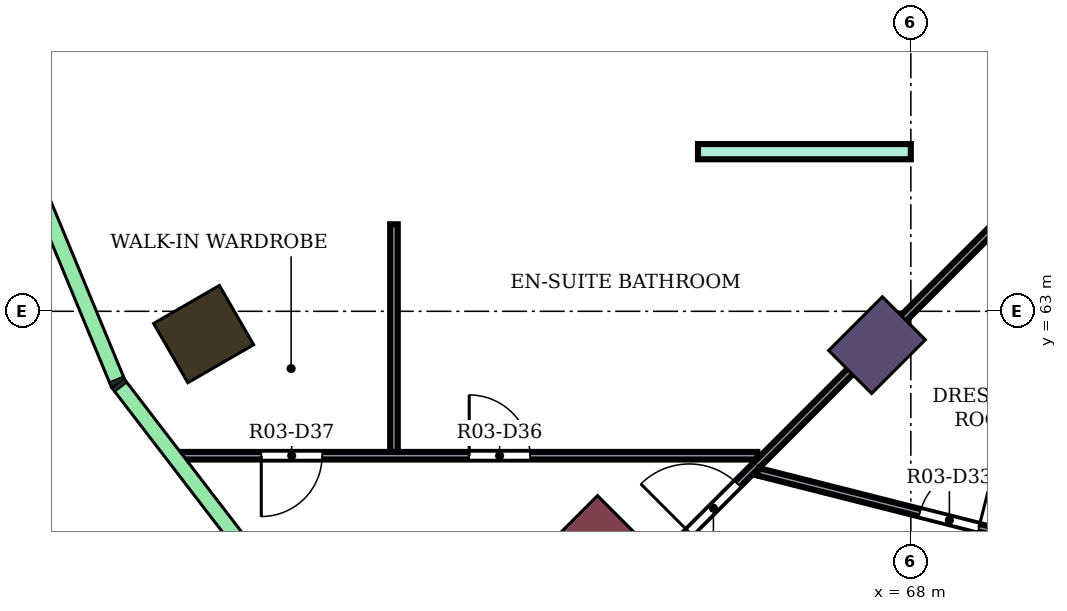
"""IFC4 building model, lengths in metres.
Left out: names, types, materials, properties, quantities, classifications, styles, units other than length and angle.
Written with IfcOpenShell. Run it as: python <this file> out.ifc"""

import sys

from ifc_helpers import new_model, si_unit, direction, frame, frame_2d, origin, origin_2d, place, context, subcontext, project, spatial, rectangle, extrude, element, fill, save


model = new_model("IFC4")
c1 = context("Model", 3, precision=1e-05, world=origin(), true_north=direction((0.0, 1.0)))
c2 = subcontext(c1, "Body", "Model", "MODEL_VIEW")
j1 = project(units=[si_unit("LENGTHUNIT", "METRE"), si_unit("PLANEANGLEUNIT", "RADIAN")], contexts=[c1])
p1 = place(None, origin())
s1 = spatial("IfcSite", under=j1, at=p1, CompositionType="ELEMENT")
p2 = place(p1, origin())
s2 = spatial("IfcBuilding", under=s1, at=p2, CompositionType="ELEMENT")
p3 = place(p2, frame((0.0, 0.0, 190.5)))
s3 = spatial("IfcBuildingStorey", under=s2, at=p3, CompositionType="ELEMENT", Elevation=190.5)
p4 = place(p3, frame((58.696, 62.7, 0.0), z_axis=(0.0, 0.0, 1.0), x_axis=(-0.866025403784, -0.5, 0.0)))
e1 = element("IfcColumn", 1, at=p4, inside=s3, PredefinedType="COLUMN", context=c2, shape_type="SweptSolid", body=[
    extrude(rectangle(XDim=1.0, YDim=0.9, at=origin_2d()), origin(), (0.0, 0.0, 1.0), 4.1),
])
p5 = place(p3, frame((67.555, 62.555, 0.0), z_axis=(0.0, 0.0, 1.0), x_axis=(-0.707106781187, -0.707106781187, 0.0)))
e2 = element("IfcColumn", 2, at=p5, inside=s3, PredefinedType="COLUMN", context=c2, shape_type="SweptSolid", body=[
    extrude(rectangle(XDim=1.0, YDim=0.8, at=origin_2d()), origin(), (0.0, 0.0, 1.0), 4.1),
])
p6 = place(p3, frame((64.09, 59.09, 0.0), z_axis=(0.0, 0.0, 1.0), x_axis=(-0.707106781187, -0.707106781187, 0.0)))
e3 = element("IfcColumn", 3, at=p6, inside=s3, PredefinedType="COLUMN", context=c2, shape_type="SweptSolid", body=[
    extrude(rectangle(XDim=1.8, YDim=2.4, at=origin_2d()), origin(), (0.0, 0.0, 1.0), 4.1),
])
p7 = place(p3, frame((65.2, 65.1, 0.0), z_axis=(0.0, 0.0, 1.0), x_axis=(1.0, 0.0, 0.0)))
e4 = element("IfcWall", 4, at=p7, inside=s3, PredefinedType="PARTITIONING", context=c2, shape_type="SweptSolid", body=[
    extrude(rectangle(XDim=2.8, YDim=0.2, at=frame_2d((1.4, 0.0))), origin(), (0.0, 0.0, 1.0), 3.65),
])
p8 = place(p3, frame((58.379, 61.1, 0.0), z_axis=(0.0, 0.0, 1.0), x_axis=(1.0, 0.0, 0.0)))
e5 = element("IfcWall", 5, at=p8, inside=s3, PredefinedType="PARTITIONING", context=c2, shape_type="SweptSolid", body=[
    extrude(rectangle(XDim=7.601, YDim=0.1, at=frame_2d((3.801, 0.0))), origin(), (0.0, 0.0, 1.0), 3.65),
])
p9 = place(p8, frame((3.811, 0.0, 0.0)))
e6 = element("IfcOpeningElement", 6, at=p9, cuts=e5, PredefinedType="OPENING", context=c2, shape_type="SweptSolid", body=[
    extrude(rectangle(XDim=0.8, YDim=2.1, at=frame_2d((0.4, 1.05))), frame((0.0, 0.06, 0.0), z_axis=(0.0, -1.0, 0.0), x_axis=(1.0, 0.0, 0.0)), (0.0, 0.0, 1.0), 0.12),
])
p10 = place(p8, frame((1.075, 0.0, 0.0)))
e7 = element("IfcOpeningElement", 7, at=p10, cuts=e5, PredefinedType="OPENING", context=c2, shape_type="SweptSolid", body=[
    extrude(rectangle(XDim=0.8, YDim=2.1, at=frame_2d((0.4, 1.05))), frame((0.0, 0.06, 0.0), z_axis=(0.0, -1.0, 0.0), x_axis=(1.0, 0.0, 0.0)), (0.0, 0.0, 1.0), 0.12),
])
p11 = place(p3, frame((61.2, 61.15, 0.0), z_axis=(0.0, 0.0, 1.0), x_axis=(0.0, 1.0, 0.0)))
e8 = element("IfcWall", 8, at=p11, inside=s3, PredefinedType="PARTITIONING", context=c2, shape_type="SweptSolid", body=[
    extrude(rectangle(XDim=2.995, YDim=0.1, at=frame_2d((1.498, 0.0))), origin(), (0.0, 0.0, 1.0), 3.65),
])
p12 = place(p3, frame((63.592, 58.6, 0.0), z_axis=(0.0, 0.0, 1.0), x_axis=(0.707272108928, 0.706941414781, 0.0)))
e9 = element("IfcWall", 9, at=p12, inside=s3, PredefinedType="PARTITIONING", context=c2, shape_type="SweptSolid", body=[
    extrude(rectangle(XDim=8.859, YDim=0.1, at=frame_2d((4.43, 0.0))), origin(), (0.0, 0.0, 1.0), 3.65),
])
p13 = place(p12, frame((2.111, 0.0, 0.0)))
e10 = element("IfcOpeningElement", 10, at=p13, cuts=e9, PredefinedType="OPENING", context=c2, shape_type="SweptSolid", body=[
    extrude(rectangle(XDim=0.9, YDim=2.1, at=frame_2d((0.45, 1.05))), frame((0.0, 0.06, 0.0), z_axis=(0.0, -1.0, 0.0), x_axis=(1.0, 0.0, 0.0)), (0.0, 0.0, 1.0), 0.12),
])
p14 = place(p3, frame((65.987, 60.889, 0.0), z_axis=(0.0, 0.0, 1.0), x_axis=(0.969431303535, -0.245362889871, 0.0)))
e11 = element("IfcWall", 11, at=p14, inside=s3, PredefinedType="PARTITIONING", context=c2, shape_type="SweptSolid", body=[
    extrude(rectangle(XDim=5.22, YDim=0.1, at=frame_2d((2.61, 0.0))), origin(), (0.0, 0.0, 1.0), 3.65),
])
p15 = place(p14, frame((2.2, 0.0, 0.0)))
e12 = element("IfcOpeningElement", 12, at=p15, cuts=e11, PredefinedType="OPENING", context=c2, shape_type="SweptSolid", body=[
    extrude(rectangle(XDim=0.8, YDim=2.1, at=frame_2d((0.4, 1.05))), frame((0.0, 0.06, 0.0), z_axis=(0.0, -1.0, 0.0), x_axis=(1.0, 0.0, 0.0)), (0.0, 0.0, 1.0), 0.12),
])
p16 = place(p3, frame((67.099, 52.66, 0.0), z_axis=(0.0, 0.0, 1.0), x_axis=(0.500286442712, 0.865859962834, 0.0)))
e13 = element("IfcWall", 13, at=p16, inside=s3, PredefinedType="PARTITIONING", context=c2, shape_type="SweptSolid", body=[
    extrude(rectangle(XDim=12.876, YDim=0.1, at=frame_2d((6.438, 0.0))), origin(), (0.0, 0.0, 1.0), 3.65),
])
p17 = place(p16, frame((2.556, 0.0, 0.0)))
e14 = element("IfcOpeningElement", 14, at=p17, cuts=e13, PredefinedType="OPENING", context=c2, shape_type="SweptSolid", body=[
    extrude(rectangle(XDim=0.9, YDim=2.1, at=frame_2d((0.45, 1.05))), frame((0.0, 0.06, 0.0), z_axis=(0.0, -1.0, 0.0), x_axis=(1.0, 0.0, 0.0)), (0.0, 0.0, 1.0), 0.12),
])
p18 = place(p16, frame((10.248, 0.0, 0.0)))
e15 = element("IfcOpeningElement", 15, at=p18, cuts=e13, PredefinedType="OPENING", context=c2, shape_type="SweptSolid", body=[
    extrude(rectangle(XDim=0.8, YDim=2.1, at=frame_2d((0.4, 1.05))), frame((0.0, 0.06, 0.0), z_axis=(0.0, -1.0, 0.0), x_axis=(1.0, 0.0, 0.0)), (0.0, 0.0, 1.0), 0.12),
])
p19 = place(p15, origin())
e16 = element("IfcDoor", 16, at=p19, inside=s3, OperationType="SINGLE_SWING_RIGHT", PredefinedType="DOOR", context=c2, shape_type="SweptSolid", body=[
    extrude(rectangle(XDim=0.8, YDim=2.1, at=frame_2d((0.4, 1.05))), frame((0.0, 0.025, 0.0), z_axis=(0.0, -1.0, 0.0), x_axis=(1.0, 0.0, 0.0)), (0.0, 0.0, 1.0), 0.05),
])
fill(e12, e16)
p20 = place(p13, origin())
e17 = element("IfcDoor", 17, at=p20, inside=s3, OperationType="SINGLE_SWING_LEFT", PredefinedType="DOOR", context=c2, shape_type="SweptSolid", body=[
    extrude(rectangle(XDim=0.9, YDim=2.1, at=frame_2d((0.45, 1.05))), frame((0.0, 0.025, 0.0), z_axis=(0.0, -1.0, 0.0), x_axis=(1.0, 0.0, 0.0)), (0.0, 0.0, 1.0), 0.05),
])
fill(e10, e17)
p21 = place(p9, origin())
e18 = element("IfcDoor", 18, at=p21, inside=s3, OperationType="SINGLE_SWING_LEFT", PredefinedType="DOOR", context=c2, shape_type="SweptSolid", body=[
    extrude(rectangle(XDim=0.8, YDim=2.1, at=frame_2d((0.4, 1.05))), frame((0.0, 0.025, 0.0), z_axis=(0.0, -1.0, 0.0), x_axis=(1.0, 0.0, 0.0)), (0.0, 0.0, 1.0), 0.05),
])
fill(e6, e18)
p22 = place(p10, frame((0.8, 0.0, 0.0), z_axis=(0.0, 0.0, 1.0), x_axis=(-1.0, 0.0, 0.0)))
e19 = element("IfcDoor", 19, at=p22, inside=s3, OperationType="SINGLE_SWING_RIGHT", PredefinedType="DOOR", context=c2, shape_type="SweptSolid", body=[
    extrude(rectangle(XDim=0.8, YDim=2.1, at=frame_2d((0.4, 1.05))), frame((0.0, 0.025, 0.0), z_axis=(0.0, -1.0, 0.0), x_axis=(1.0, 0.0, 0.0)), (0.0, 0.0, 1.0), 0.05),
])
fill(e7, e19)
save(model, sys.argv[1])
